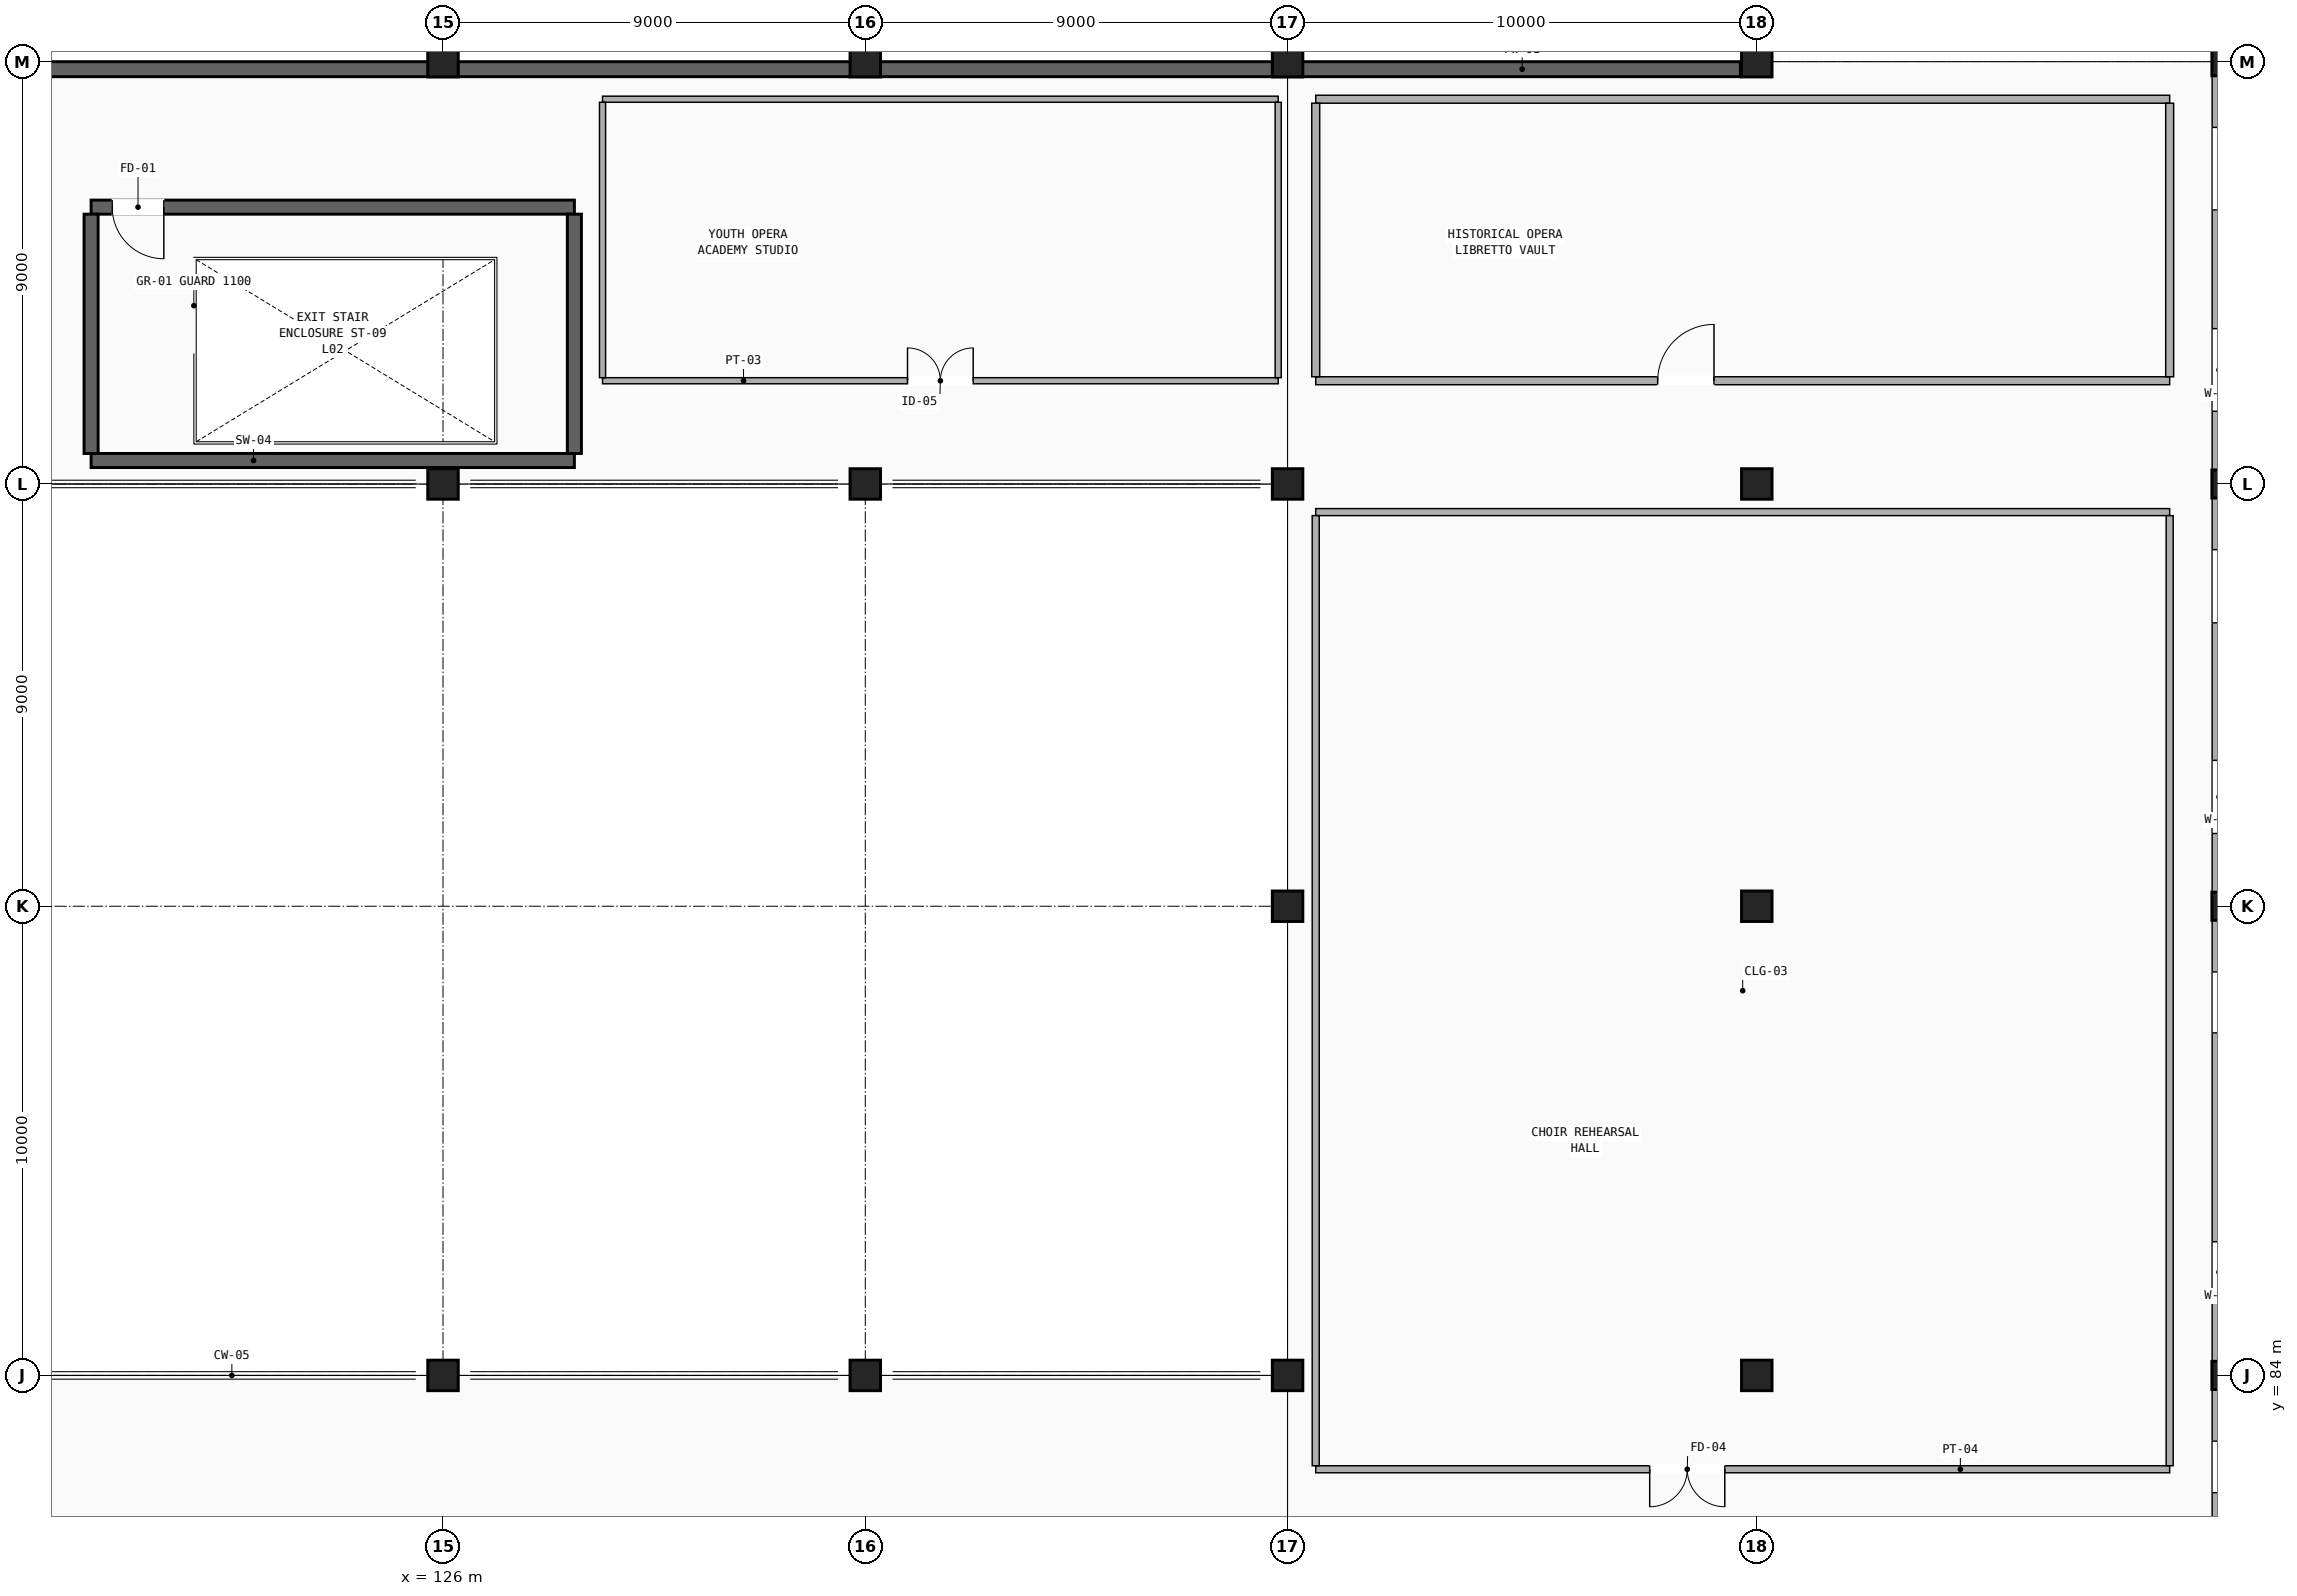
"""IFC4 building model, lengths in metres.
Left out: names, types, materials, properties, quantities, classifications, styles, units other than length and angle.
Written with IfcOpenShell. Run it as: python <this file> out.ifc"""

import sys

from ifc_helpers import new_model, si_unit, direction, frame, frame_2d, origin, origin_2d, place, context, subcontext, project, spatial, rectangle, extrude, element, fill, save


model = new_model("IFC4")
c1 = context("Model", 3, precision=1e-05, world=origin(), true_north=direction((0.0, 1.0)))
c2 = subcontext(c1, "Body", "Model", "MODEL_VIEW")
j1 = project(units=[si_unit("LENGTHUNIT", "METRE"), si_unit("PLANEANGLEUNIT", "RADIAN")], contexts=[c1])
p1 = place(None, origin())
s1 = spatial("IfcSite", under=j1, at=p1, CompositionType="ELEMENT")
p2 = place(p1, origin())
s2 = spatial("IfcBuilding", under=s1, at=p2, CompositionType="ELEMENT")
p3 = place(p2, frame((0.0, 0.0, 9.52)))
s3 = spatial("IfcBuildingStorey", under=s2, at=p3, CompositionType="ELEMENT", Elevation=9.52)
for number, where, z_axis, x_axis in (
    (1, (126.0, 84.0, 0.0), (0.0, 0.0, 1.0), (1.0, 0.0, 0.0)),
    (2, (126.0, 103.0, 0.0), (0.0, 0.0, 1.0), (1.0, 0.0, 0.0)),
    (3, (126.0, 112.0, 0.0), (0.0, 0.0, 1.0), (1.0, 0.0, 0.0)),
    (4, (135.0, 84.0, 0.0), (0.0, 0.0, 1.0), (1.0, 0.0, 0.0)),
    (5, (135.0, 103.0, 0.0), (0.0, 0.0, 1.0), (1.0, 0.0, 0.0)),
    (6, (135.0, 112.0, 0.0), (0.0, 0.0, 1.0), (1.0, 0.0, 0.0)),
    (7, (144.0, 84.0, 0.0), (0.0, 0.0, 1.0), (1.0, 0.0, 0.0)),
    (8, (144.0, 94.0, 0.0), (0.0, 0.0, 1.0), (1.0, 0.0, 0.0)),
    (9, (144.0, 103.0, 0.0), (0.0, 0.0, 1.0), (1.0, 0.0, 0.0)),
    (10, (144.0, 112.0, 0.0), (0.0, 0.0, 1.0), (1.0, 0.0, 0.0)),
    (11, (154.0, 84.0, 0.0), (0.0, 0.0, 1.0), (1.0, 0.0, 0.0)),
    (12, (154.0, 94.0, 0.0), (0.0, 0.0, 1.0), (1.0, 0.0, 0.0)),
    (13, (154.0, 103.0, 0.0), (0.0, 0.0, 1.0), (1.0, 0.0, 0.0)),
    (14, (154.0, 112.0, 0.0), (0.0, 0.0, 1.0), (1.0, 0.0, 0.0)),
):
    element("IfcColumn", number, at=place(p3, frame(where, z_axis=z_axis, x_axis=x_axis)), inside=s3, PredefinedType="COLUMN", context=c2, shape_type="SweptSolid", body=[
        extrude(rectangle(XDim=0.65, YDim=0.65, at=origin_2d()), origin(), (0.0, 0.0, 1.0), 4.08),
    ])
for number, where, z_axis, x_axis in (
    (15, (164.0, 84.0, 0.0), (0.0, 0.0, 1.0), (1.0, 0.0, 0.0)),
    (16, (164.0, 94.0, 0.0), (0.0, 0.0, 1.0), (1.0, 0.0, 0.0)),
    (17, (164.0, 103.0, 0.0), (0.0, 0.0, 1.0), (1.0, 0.0, 0.0)),
    (18, (164.0, 112.0, 0.0), (0.0, 0.0, 1.0), (1.0, 0.0, 0.0)),
):
    element("IfcColumn", number, at=place(p3, frame(where, z_axis=z_axis, x_axis=x_axis)), inside=s3, PredefinedType="COLUMN", context=c2, shape_type="SweptSolid", body=[
        extrude(rectangle(XDim=0.6, YDim=0.6, at=origin_2d()), origin(), (0.0, 0.0, 1.0), 4.08),
    ])
p4 = place(p3, frame((118.5, 103.5, 0.0), z_axis=(0.0, 0.0, 1.0), x_axis=(1.0, 0.0, 0.0)))
e19 = element("IfcWall", 19, at=p4, inside=s3, PredefinedType="SHEAR", context=c2, shape_type="SweptSolid", body=[
    extrude(rectangle(XDim=10.3, YDim=0.3, at=frame_2d((5.15, 0.0))), origin(), (0.0, 0.0, 1.0), 4.08),
])
p5 = place(p3, frame((118.5, 108.9, 0.0), z_axis=(0.0, 0.0, 1.0), x_axis=(1.0, 0.0, 0.0)))
e20 = element("IfcWall", 20, at=p5, inside=s3, PredefinedType="SHEAR", context=c2, shape_type="SweptSolid", body=[
    extrude(rectangle(XDim=10.3, YDim=0.3, at=frame_2d((5.15, 0.0))), origin(), (0.0, 0.0, 1.0), 4.08),
])
p6 = place(p5, frame((0.45, 0.0, 0.0)))
e21 = element("IfcOpeningElement", 21, at=p6, cuts=e20, PredefinedType="OPENING", context=c2, shape_type="SweptSolid", body=[
    extrude(rectangle(XDim=1.1, YDim=2.2, at=frame_2d((0.55, 1.1))), frame((0.0, 0.16, 0.0), z_axis=(0.0, -1.0, 0.0), x_axis=(1.0, 0.0, 0.0)), (0.0, 0.0, 1.0), 0.32),
])
for number, where, z_axis, x_axis in (
    (22, (118.5, 103.65, 0.0), (0.0, 0.0, 1.0), (0.0, 1.0, 0.0)),
    (23, (128.8, 103.65, 0.0), (0.0, 0.0, 1.0), (0.0, 1.0, 0.0)),
):
    element("IfcWall", number, at=place(p3, frame(where, z_axis=z_axis, x_axis=x_axis)), inside=s3, PredefinedType="SHEAR", context=c2, shape_type="SweptSolid", body=[
        extrude(rectangle(XDim=5.1, YDim=0.3, at=frame_2d((2.55, 0.0))), origin(), (0.0, 0.0, 1.0), 4.08),
    ])
p7 = place(p3, frame((73.775, 111.84, 0.0), z_axis=(0.0, 0.0, 1.0), x_axis=(1.0, 0.0, 0.0)))
e24 = element("IfcWall", 24, at=p7, inside=s3, PredefinedType="SHEAR", context=c2, shape_type="SweptSolid", body=[
    extrude(rectangle(XDim=79.875, YDim=0.32, at=frame_2d((39.938, 0.0))), origin(), (0.0, 0.0, 1.0), 4.08),
])
p8 = place(p3, frame((163.85, 75.3, 0.0), z_axis=(0.0, 0.0, 1.0), x_axis=(0.0, 1.0, 0.0)))
e25 = element("IfcWall", 25, at=p8, inside=s3, PredefinedType="STANDARD", context=c2, shape_type="SweptSolid", body=[
    extrude(rectangle(XDim=8.4, YDim=0.29, at=frame_2d((4.2, 0.0))), origin(), (0.0, 0.0, 1.0), 3.277),
])
p9 = place(p8, frame((1.25, 0.0, 0.9)))
e26 = element("IfcOpeningElement", 26, at=p9, cuts=e25, PredefinedType="OPENING", context=c2, shape_type="SweptSolid", body=[
    extrude(rectangle(XDim=1.1, YDim=2.0, at=frame_2d((0.55, 1.0))), frame((0.0, 0.155, 0.0), z_axis=(0.0, -1.0, 0.0), x_axis=(1.0, 0.0, 0.0)), (0.0, 0.0, 1.0), 0.31),
])
p10 = place(p8, frame((6.2, 0.0, 0.9)))
e27 = element("IfcOpeningElement", 27, at=p10, cuts=e25, PredefinedType="OPENING", context=c2, shape_type="SweptSolid", body=[
    extrude(rectangle(XDim=1.1, YDim=2.0, at=frame_2d((0.55, 1.0))), frame((0.0, 0.155, 0.0), z_axis=(0.0, -1.0, 0.0), x_axis=(1.0, 0.0, 0.0)), (0.0, 0.0, 1.0), 0.31),
])
p11 = place(p3, frame((163.85, 84.3, 0.0), z_axis=(0.0, 0.0, 1.0), x_axis=(0.0, 1.0, 0.0)))
e28 = element("IfcWall", 28, at=p11, inside=s3, PredefinedType="STANDARD", context=c2, shape_type="SweptSolid", body=[
    extrude(rectangle(XDim=9.4, YDim=0.29, at=frame_2d((4.7, 0.0))), origin(), (0.0, 0.0, 1.0), 3.277),
])
p12 = place(p11, frame((1.25, 0.0, 0.9)))
e29 = element("IfcOpeningElement", 29, at=p12, cuts=e28, PredefinedType="OPENING", context=c2, shape_type="SweptSolid", body=[
    extrude(rectangle(XDim=1.3, YDim=1.72, at=frame_2d((0.65, 0.86))), frame((0.0, 0.155, 0.0), z_axis=(0.0, -1.0, 0.0), x_axis=(1.0, 0.0, 0.0)), (0.0, 0.0, 1.0), 0.31),
])
p13 = place(p11, frame((7.0, 0.0, 0.9)))
e30 = element("IfcOpeningElement", 30, at=p13, cuts=e28, PredefinedType="OPENING", context=c2, shape_type="SweptSolid", body=[
    extrude(rectangle(XDim=1.3, YDim=1.72, at=frame_2d((0.65, 0.86))), frame((0.0, 0.155, 0.0), z_axis=(0.0, -1.0, 0.0), x_axis=(1.0, 0.0, 0.0)), (0.0, 0.0, 1.0), 0.31),
])
p14 = place(p3, frame((163.85, 94.3, 0.0), z_axis=(0.0, 0.0, 1.0), x_axis=(0.0, 1.0, 0.0)))
e31 = element("IfcWall", 31, at=p14, inside=s3, PredefinedType="STANDARD", context=c2, shape_type="SweptSolid", body=[
    extrude(rectangle(XDim=8.4, YDim=0.29, at=frame_2d((4.2, 0.0))), origin(), (0.0, 0.0, 1.0), 3.277),
])
p15 = place(p14, frame((1.25, 0.0, 0.9)))
e32 = element("IfcOpeningElement", 32, at=p15, cuts=e31, PredefinedType="OPENING", context=c2, shape_type="SweptSolid", body=[
    extrude(rectangle(XDim=1.56, YDim=1.72, at=frame_2d((0.78, 0.86))), frame((0.0, 0.155, 0.0), z_axis=(0.0, -1.0, 0.0), x_axis=(1.0, 0.0, 0.0)), (0.0, 0.0, 1.0), 0.31),
])
p16 = place(p14, frame((5.74, 0.0, 0.9)))
e33 = element("IfcOpeningElement", 33, at=p16, cuts=e31, PredefinedType="OPENING", context=c2, shape_type="SweptSolid", body=[
    extrude(rectangle(XDim=1.56, YDim=1.72, at=frame_2d((0.78, 0.86))), frame((0.0, 0.155, 0.0), z_axis=(0.0, -1.0, 0.0), x_axis=(1.0, 0.0, 0.0)), (0.0, 0.0, 1.0), 0.31),
])
p17 = place(p3, frame((163.85, 103.3, 0.0), z_axis=(0.0, 0.0, 1.0), x_axis=(0.0, 1.0, 0.0)))
e34 = element("IfcWall", 34, at=p17, inside=s3, PredefinedType="STANDARD", context=c2, shape_type="SweptSolid", body=[
    extrude(rectangle(XDim=8.4, YDim=0.29, at=frame_2d((4.2, 0.0))), origin(), (0.0, 0.0, 1.0), 3.277),
])
p18 = place(p17, frame((1.25, 0.0, 0.9)))
e35 = element("IfcOpeningElement", 35, at=p18, cuts=e34, PredefinedType="OPENING", context=c2, shape_type="SweptSolid", body=[
    extrude(rectangle(XDim=1.76, YDim=1.72, at=frame_2d((0.88, 0.86))), frame((0.0, 0.155, 0.0), z_axis=(0.0, -1.0, 0.0), x_axis=(1.0, 0.0, 0.0)), (0.0, 0.0, 1.0), 0.31),
])
p19 = place(p17, frame((5.54, 0.0, 0.9)))
e36 = element("IfcOpeningElement", 36, at=p19, cuts=e34, PredefinedType="OPENING", context=c2, shape_type="SweptSolid", body=[
    extrude(rectangle(XDim=1.76, YDim=1.72, at=frame_2d((0.88, 0.86))), frame((0.0, 0.155, 0.0), z_axis=(0.0, -1.0, 0.0), x_axis=(1.0, 0.0, 0.0)), (0.0, 0.0, 1.0), 0.31),
])
p20 = place(p3, frame((144.6, 82.0, 0.0), z_axis=(0.0, 0.0, 1.0), x_axis=(1.0, 0.0, 0.0)))
e37 = element("IfcWall", 37, at=p20, inside=s3, PredefinedType="PARTITIONING", context=c2, shape_type="SweptSolid", body=[
    extrude(rectangle(XDim=18.2, YDim=0.15, at=frame_2d((9.1, 0.0))), origin(), (0.0, 0.0, 1.0), 3.17),
])
p21 = place(p20, frame((7.118, 0.0, 0.0)))
e38 = element("IfcOpeningElement", 38, at=p21, cuts=e37, PredefinedType="OPENING", context=c2, shape_type="SweptSolid", body=[
    extrude(rectangle(XDim=1.6, YDim=2.25, at=frame_2d((0.8, 1.125))), frame((0.0, 0.085, 0.0), z_axis=(0.0, -1.0, 0.0), x_axis=(1.0, 0.0, 0.0)), (0.0, 0.0, 1.0), 0.17),
])
p22 = place(p3, frame((144.6, 102.4, 0.0), z_axis=(0.0, 0.0, 1.0), x_axis=(1.0, 0.0, 0.0)))
e39 = element("IfcWall", 39, at=p22, inside=s3, PredefinedType="PARTITIONING", context=c2, shape_type="SweptSolid", body=[
    extrude(rectangle(XDim=18.2, YDim=0.15, at=frame_2d((9.1, 0.0))), origin(), (0.0, 0.0, 1.0), 3.277),
])
p23 = place(p3, frame((144.6, 82.075, 0.0), z_axis=(0.0, 0.0, 1.0), x_axis=(0.0, 1.0, 0.0)))
e40 = element("IfcWall", 40, at=p23, inside=s3, PredefinedType="PARTITIONING", context=c2, shape_type="SweptSolid", body=[
    extrude(rectangle(XDim=20.25, YDim=0.15, at=frame_2d((10.125, 0.0))), origin(), (0.0, 0.0, 1.0), 2.92),
])
p24 = place(p3, frame((162.8, 82.075, 0.0), z_axis=(0.0, 0.0, 1.0), x_axis=(0.0, 1.0, 0.0)))
e41 = element("IfcWall", 41, at=p24, inside=s3, PredefinedType="PARTITIONING", context=c2, shape_type="SweptSolid", body=[
    extrude(rectangle(XDim=20.25, YDim=0.15, at=frame_2d((10.125, 0.0))), origin(), (0.0, 0.0, 1.0), 3.277),
])
p25 = place(p3, frame((129.4, 105.2, 0.0), z_axis=(0.0, 0.0, 1.0), x_axis=(1.0, 0.0, 0.0)))
e42 = element("IfcWall", 42, at=p25, inside=s3, PredefinedType="PARTITIONING", context=c2, shape_type="SweptSolid", body=[
    extrude(rectangle(XDim=14.4, YDim=0.13, at=frame_2d((7.2, 0.0))), origin(), (0.0, 0.0, 1.0), 3.277),
])
p26 = place(p25, frame((6.5, 0.0, 0.0)))
e43 = element("IfcOpeningElement", 43, at=p26, cuts=e42, PredefinedType="OPENING", context=c2, shape_type="SweptSolid", body=[
    extrude(rectangle(XDim=1.4, YDim=2.2, at=frame_2d((0.7, 1.1))), frame((0.0, 0.075, 0.0), z_axis=(0.0, -1.0, 0.0), x_axis=(1.0, 0.0, 0.0)), (0.0, 0.0, 1.0), 0.15),
])
p27 = place(p3, frame((129.4, 111.2, 0.0), z_axis=(0.0, 0.0, 1.0), x_axis=(1.0, 0.0, 0.0)))
e44 = element("IfcWall", 44, at=p27, inside=s3, PredefinedType="PARTITIONING", context=c2, shape_type="SweptSolid", body=[
    extrude(rectangle(XDim=14.4, YDim=0.13, at=frame_2d((7.2, 0.0))), origin(), (0.0, 0.0, 1.0), 3.277),
])
p28 = place(p3, frame((129.4, 105.265, 0.0), z_axis=(0.0, 0.0, 1.0), x_axis=(0.0, 1.0, 0.0)))
e45 = element("IfcWall", 45, at=p28, inside=s3, PredefinedType="PARTITIONING", context=c2, shape_type="SweptSolid", body=[
    extrude(rectangle(XDim=5.87, YDim=0.13, at=frame_2d((2.935, 0.0))), origin(), (0.0, 0.0, 1.0), 3.84),
])
p29 = place(p3, frame((143.8, 105.265, 0.0), z_axis=(0.0, 0.0, 1.0), x_axis=(0.0, 1.0, 0.0)))
e46 = element("IfcWall", 46, at=p29, inside=s3, PredefinedType="PARTITIONING", context=c2, shape_type="SweptSolid", body=[
    extrude(rectangle(XDim=5.87, YDim=0.13, at=frame_2d((2.935, 0.0))), origin(), (0.0, 0.0, 1.0), 3.277),
])
p30 = place(p3, frame((144.6, 105.2, 0.0), z_axis=(0.0, 0.0, 1.0), x_axis=(1.0, 0.0, 0.0)))
e47 = element("IfcWall", 47, at=p30, inside=s3, PredefinedType="PARTITIONING", context=c2, shape_type="SweptSolid", body=[
    extrude(rectangle(XDim=18.2, YDim=0.17, at=frame_2d((9.1, 0.0))), origin(), (0.0, 0.0, 1.0), 3.277),
])
p31 = place(p30, frame((7.288, 0.0, 0.0)))
e48 = element("IfcOpeningElement", 48, at=p31, cuts=e47, PredefinedType="OPENING", context=c2, shape_type="SweptSolid", body=[
    extrude(rectangle(XDim=1.2, YDim=2.2, at=frame_2d((0.6, 1.1))), frame((0.0, 0.095, 0.0), z_axis=(0.0, -1.0, 0.0), x_axis=(1.0, 0.0, 0.0)), (0.0, 0.0, 1.0), 0.19),
])
p32 = place(p3, frame((144.6, 111.2, 0.0), z_axis=(0.0, 0.0, 1.0), x_axis=(1.0, 0.0, 0.0)))
e49 = element("IfcWall", 49, at=p32, inside=s3, PredefinedType="PARTITIONING", context=c2, shape_type="SweptSolid", body=[
    extrude(rectangle(XDim=18.2, YDim=0.17, at=frame_2d((9.1, 0.0))), origin(), (0.0, 0.0, 1.0), 3.277),
])
for number, where, z_axis, x_axis in (
    (50, (144.6, 105.285, 0.0), (0.0, 0.0, 1.0), (0.0, 1.0, 0.0)),
    (51, (162.8, 105.285, 0.0), (0.0, 0.0, 1.0), (0.0, 1.0, 0.0)),
):
    element("IfcWall", number, at=place(p3, frame(where, z_axis=z_axis, x_axis=x_axis)), inside=s3, PredefinedType="PARTITIONING", context=c2, shape_type="SweptSolid", body=[
        extrude(rectangle(XDim=5.83, YDim=0.17, at=frame_2d((2.915, 0.0))), origin(), (0.0, 0.0, 1.0), 3.84),
    ])
p33 = place(p6, frame((1.1, 0.0, 0.0), z_axis=(0.0, 0.0, 1.0), x_axis=(-1.0, 0.0, 0.0)))
e52 = element("IfcDoor", 52, at=p33, inside=s3, OperationType="SINGLE_SWING_LEFT", PredefinedType="DOOR", context=c2, shape_type="SweptSolid", body=[
    extrude(rectangle(XDim=1.1, YDim=2.2, at=frame_2d((0.55, 1.1))), frame((0.0, 0.025, 0.0), z_axis=(0.0, -1.0, 0.0), x_axis=(1.0, 0.0, 0.0)), (0.0, 0.0, 1.0), 0.05),
])
fill(e21, e52)
p34 = place(p21, frame((1.6, 0.0, 0.0), z_axis=(0.0, 0.0, 1.0), x_axis=(-1.0, 0.0, 0.0)))
e53 = element("IfcDoor", 53, at=p34, inside=s3, OperationType="DOUBLE_DOOR_SINGLE_SWING", PredefinedType="DOOR", context=c2, shape_type="SweptSolid", body=[
    extrude(rectangle(XDim=1.6, YDim=2.25, at=frame_2d((0.8, 1.125))), frame((0.0, 0.025, 0.0), z_axis=(0.0, -1.0, 0.0), x_axis=(1.0, 0.0, 0.0)), (0.0, 0.0, 1.0), 0.05),
])
fill(e38, e53)
p35 = place(p26, origin())
e54 = element("IfcDoor", 54, at=p35, inside=s3, OperationType="DOUBLE_DOOR_SINGLE_SWING", PredefinedType="DOOR", context=c2, shape_type="SweptSolid", body=[
    extrude(rectangle(XDim=1.4, YDim=2.2, at=frame_2d((0.7, 1.1))), frame((0.0, 0.025, 0.0), z_axis=(0.0, -1.0, 0.0), x_axis=(1.0, 0.0, 0.0)), (0.0, 0.0, 1.0), 0.05),
])
fill(e43, e54)
p36 = place(p31, origin())
e55 = element("IfcDoor", 55, at=p36, inside=s3, OperationType="SINGLE_SWING_RIGHT", PredefinedType="DOOR", context=c2, shape_type="SweptSolid", body=[
    extrude(rectangle(XDim=1.2, YDim=2.2, at=frame_2d((0.6, 1.1))), frame((0.0, 0.025, 0.0), z_axis=(0.0, -1.0, 0.0), x_axis=(1.0, 0.0, 0.0)), (0.0, 0.0, 1.0), 0.05),
])
fill(e48, e55)
save(model, sys.argv[1])
